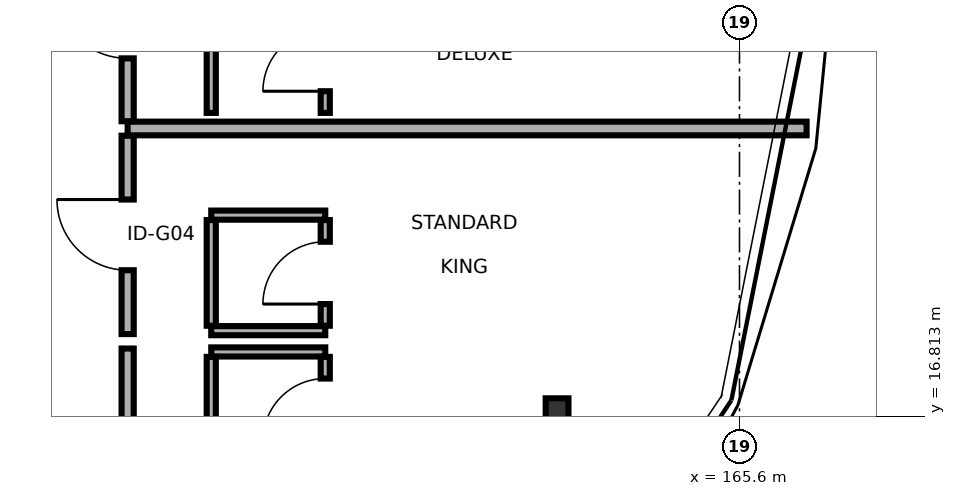
"""IFC4 building model, lengths in metres.
Left out: names, types, materials, properties, quantities, classifications, styles, units other than length and angle.
Written with IfcOpenShell. Run it as: python <this file> out.ifc"""

import sys

from ifc_helpers import new_model, si_unit, direction, frame, frame_2d, origin, origin_2d, place, context, subcontext, project, spatial, rectangle, i_section, extrude, element, fill, save


model = new_model("IFC4")
c1 = context("Model", 3, precision=1e-05, world=origin(), true_north=direction((0.0, 1.0)))
c2 = subcontext(c1, "Body", "Model", "MODEL_VIEW")
j1 = project(units=[si_unit("LENGTHUNIT", "METRE"), si_unit("PLANEANGLEUNIT", "RADIAN")], contexts=[c1])
p1 = place(None, origin())
s1 = spatial("IfcSite", under=j1, at=p1, CompositionType="ELEMENT")
p2 = place(p1, origin())
s2 = spatial("IfcBuilding", under=s1, at=p2, CompositionType="ELEMENT")
p3 = place(p2, frame((0.0, 0.0, 24.9)))
s3 = spatial("IfcBuildingStorey", under=s2, at=p3, CompositionType="ELEMENT", Elevation=24.9)
p4 = place(p3, frame((163.2, 16.8, 0.0), z_axis=(0.0, 0.0, 1.0), x_axis=(1.0, 0.0, 0.0)))
e1 = element("IfcColumn", 1, at=p4, inside=s3, PredefinedType="COLUMN", context=c2, shape_type="SweptSolid", body=[
    extrude(i_section(OverallWidth=0.3, OverallDepth=0.5, WebThickness=0.014, FlangeThickness=0.028, FilletRadius=0.027, at=origin_2d()), origin(), (0.0, 0.0, 1.0), 3.4),
])
p5 = place(p3, frame((157.55, 15.095, 0.0), z_axis=(0.0, 0.0, 1.0), x_axis=(0.0, 1.0, 0.0)))
e2 = element("IfcWall", 2, at=p5, inside=s3, PredefinedType="PARTITIONING", context=c2, shape_type="SweptSolid", body=[
    extrude(rectangle(XDim=2.61, YDim=0.16, at=frame_2d((1.305, 0.0))), origin(), (0.0, 0.0, 1.0), 2.725),
])
p6 = place(p5, frame((0.16, 0.0, 0.0)))
e3 = element("IfcOpeningElement", 3, at=p6, cuts=e2, PredefinedType="OPENING", context=c2, shape_type="SweptSolid", body=[
    extrude(rectangle(XDim=0.905, YDim=2.05, at=frame_2d((0.453, 1.025))), frame((0.0, 0.09, 0.0), z_axis=(0.0, -1.0, 0.0), x_axis=(1.0, 0.0, 0.0)), (0.0, 0.0, 1.0), 0.18),
])
p7 = place(p3, frame((158.65, 17.66, 0.0), z_axis=(0.0, 0.0, 1.0), x_axis=(1.0, 0.0, 0.0)))
e4 = element("IfcWall", 4, at=p7, inside=s3, PredefinedType="PARTITIONING", context=c2, shape_type="SweptSolid", body=[
    extrude(rectangle(XDim=1.5, YDim=0.12, at=frame_2d((0.75, 0.0))), origin(), (0.0, 0.0, 1.0), 3.19),
])
p8 = place(p3, frame((158.65, 16.205, 0.0), z_axis=(0.0, 0.0, 1.0), x_axis=(0.0, 1.0, 0.0)))
e5 = element("IfcWall", 5, at=p8, inside=s3, PredefinedType="PARTITIONING", context=c2, shape_type="SweptSolid", body=[
    extrude(rectangle(XDim=1.39, YDim=0.12, at=frame_2d((0.695, 0.0))), origin(), (0.0, 0.0, 1.0), 2.725),
])
p9 = place(p3, frame((160.15, 16.205, 0.0), z_axis=(0.0, 0.0, 1.0), x_axis=(0.0, 1.0, 0.0)))
e6 = element("IfcWall", 6, at=p9, inside=s3, PredefinedType="PARTITIONING", context=c2, shape_type="SweptSolid", body=[
    extrude(rectangle(XDim=1.39, YDim=0.12, at=frame_2d((0.695, 0.0))), origin(), (0.0, 0.0, 1.0), 2.725),
])
p10 = place(p9, frame((0.285, 0.0, 0.0)))
e7 = element("IfcOpeningElement", 7, at=p10, cuts=e6, PredefinedType="OPENING", context=c2, shape_type="SweptSolid", body=[
    extrude(rectangle(XDim=0.82, YDim=2.08, at=frame_2d((0.41, 1.04))), frame((0.0, 0.07, 0.0), z_axis=(0.0, -1.0, 0.0), x_axis=(1.0, 0.0, 0.0)), (0.0, 0.0, 1.0), 0.14),
])
p11 = place(p3, frame((157.55, 17.895, 0.0), z_axis=(0.0, 0.0, 1.0), x_axis=(0.0, 1.0, 0.0)))
e8 = element("IfcWall", 8, at=p11, inside=s3, PredefinedType="PARTITIONING", context=c2, shape_type="SweptSolid", body=[
    extrude(rectangle(XDim=2.61, YDim=0.16, at=frame_2d((1.305, 0.0))), origin(), (0.0, 0.0, 1.0), 3.19),
])
p12 = place(p11, frame((0.84, 0.0, 0.0)))
e9 = element("IfcOpeningElement", 9, at=p12, cuts=e8, PredefinedType="OPENING", context=c2, shape_type="SweptSolid", body=[
    extrude(rectangle(XDim=0.93, YDim=2.05, at=frame_2d((0.465, 1.025))), frame((0.0, 0.09, 0.0), z_axis=(0.0, -1.0, 0.0), x_axis=(1.0, 0.0, 0.0)), (0.0, 0.0, 1.0), 0.18),
])
for number, where, z_axis, x_axis in (
    (10, (158.65, 17.94, 0.0), (0.0, 0.0, 1.0), (1.0, 0.0, 0.0)),
    (11, (158.65, 19.46, 0.0), (0.0, 0.0, 1.0), (1.0, 0.0, 0.0)),
):
    element("IfcWall", number, at=place(p3, frame(where, z_axis=z_axis, x_axis=x_axis)), inside=s3, PredefinedType="PARTITIONING", context=c2, shape_type="SweptSolid", body=[
        extrude(rectangle(XDim=1.5, YDim=0.12, at=frame_2d((0.75, 0.0))), origin(), (0.0, 0.0, 1.0), 3.19),
    ])
p13 = place(p3, frame((158.65, 18.005, 0.0), z_axis=(0.0, 0.0, 1.0), x_axis=(0.0, 1.0, 0.0)))
e12 = element("IfcWall", 12, at=p13, inside=s3, PredefinedType="PARTITIONING", context=c2, shape_type="SweptSolid", body=[
    extrude(rectangle(XDim=1.39, YDim=0.12, at=frame_2d((0.695, 0.0))), origin(), (0.0, 0.0, 1.0), 3.19),
])
p14 = place(p3, frame((160.15, 18.005, 0.0), z_axis=(0.0, 0.0, 1.0), x_axis=(0.0, 1.0, 0.0)))
e13 = element("IfcWall", 13, at=p14, inside=s3, PredefinedType="PARTITIONING", context=c2, shape_type="SweptSolid", body=[
    extrude(rectangle(XDim=1.39, YDim=0.12, at=frame_2d((0.695, 0.0))), origin(), (0.0, 0.0, 1.0), 3.19),
])
p15 = place(p14, frame((0.285, 0.0, 0.0)))
e14 = element("IfcOpeningElement", 14, at=p15, cuts=e13, PredefinedType="OPENING", context=c2, shape_type="SweptSolid", body=[
    extrude(rectangle(XDim=0.82, YDim=2.08, at=frame_2d((0.41, 1.04))), frame((0.0, 0.07, 0.0), z_axis=(0.0, -1.0, 0.0), x_axis=(1.0, 0.0, 0.0)), (0.0, 0.0, 1.0), 0.14),
])
p16 = place(p3, frame((157.55, 20.6, 0.0), z_axis=(0.0, 0.0, 1.0), x_axis=(1.0, 0.0, 0.0)))
e15 = element("IfcWall", 15, at=p16, inside=s3, PredefinedType="PARTITIONING", context=c2, shape_type="SweptSolid", body=[
    extrude(rectangle(XDim=8.933, YDim=0.18, at=frame_2d((4.466, 0.0))), origin(), (0.0, 0.0, 1.0), 2.675),
])
p17 = place(p3, frame((157.55, 20.695, 0.0), z_axis=(0.0, 0.0, 1.0), x_axis=(0.0, 1.0, 0.0)))
e16 = element("IfcWall", 16, at=p17, inside=s3, PredefinedType="PARTITIONING", context=c2, shape_type="SweptSolid", body=[
    extrude(rectangle(XDim=2.61, YDim=0.16, at=frame_2d((1.305, 0.0))), origin(), (0.0, 0.0, 1.0), 3.19),
])
p18 = place(p17, frame((0.827, 0.0, 0.0)))
e17 = element("IfcOpeningElement", 17, at=p18, cuts=e16, PredefinedType="OPENING", context=c2, shape_type="SweptSolid", body=[
    extrude(rectangle(XDim=0.955, YDim=2.05, at=frame_2d((0.478, 1.025))), frame((0.0, 0.09, 0.0), z_axis=(0.0, -1.0, 0.0), x_axis=(1.0, 0.0, 0.0)), (0.0, 0.0, 1.0), 0.18),
])
p19 = place(p3, frame((158.65, 20.805, 0.0), z_axis=(0.0, 0.0, 1.0), x_axis=(0.0, 1.0, 0.0)))
e18 = element("IfcWall", 18, at=p19, inside=s3, PredefinedType="PARTITIONING", context=c2, shape_type="SweptSolid", body=[
    extrude(rectangle(XDim=1.39, YDim=0.12, at=frame_2d((0.695, 0.0))), origin(), (0.0, 0.0, 1.0), 3.19),
])
p20 = place(p3, frame((160.15, 20.805, 0.0), z_axis=(0.0, 0.0, 1.0), x_axis=(0.0, 1.0, 0.0)))
e19 = element("IfcWall", 19, at=p20, inside=s3, PredefinedType="PARTITIONING", context=c2, shape_type="SweptSolid", body=[
    extrude(rectangle(XDim=1.39, YDim=0.12, at=frame_2d((0.695, 0.0))), origin(), (0.0, 0.0, 1.0), 3.19),
])
p21 = place(p20, frame((0.285, 0.0, 0.0)))
e20 = element("IfcOpeningElement", 20, at=p21, cuts=e19, PredefinedType="OPENING", context=c2, shape_type="SweptSolid", body=[
    extrude(rectangle(XDim=0.82, YDim=2.08, at=frame_2d((0.41, 1.04))), frame((0.0, 0.07, 0.0), z_axis=(0.0, -1.0, 0.0), x_axis=(1.0, 0.0, 0.0)), (0.0, 0.0, 1.0), 0.14),
])
p22 = place(p10, origin())
e21 = element("IfcDoor", 21, at=p22, inside=s3, OperationType="SINGLE_SWING_LEFT", PredefinedType="DOOR", context=c2, shape_type="SweptSolid", body=[
    extrude(rectangle(XDim=0.82, YDim=2.08, at=frame_2d((0.41, 1.04))), frame((0.0, 0.025, 0.0), z_axis=(0.0, -1.0, 0.0), x_axis=(1.0, 0.0, 0.0)), (0.0, 0.0, 1.0), 0.05),
])
fill(e7, e21)
p23 = place(p12, origin())
e22 = element("IfcDoor", 22, at=p23, inside=s3, OperationType="SINGLE_SWING_RIGHT", PredefinedType="DOOR", context=c2, shape_type="SweptSolid", body=[
    extrude(rectangle(XDim=0.93, YDim=2.05, at=frame_2d((0.465, 1.025))), frame((0.0, 0.025, 0.0), z_axis=(0.0, -1.0, 0.0), x_axis=(1.0, 0.0, 0.0)), (0.0, 0.0, 1.0), 0.05),
])
fill(e9, e22)
p24 = place(p15, origin())
e23 = element("IfcDoor", 23, at=p24, inside=s3, OperationType="SINGLE_SWING_LEFT", PredefinedType="DOOR", context=c2, shape_type="SweptSolid", body=[
    extrude(rectangle(XDim=0.82, YDim=2.08, at=frame_2d((0.41, 1.04))), frame((0.0, 0.025, 0.0), z_axis=(0.0, -1.0, 0.0), x_axis=(1.0, 0.0, 0.0)), (0.0, 0.0, 1.0), 0.05),
])
fill(e14, e23)
p25 = place(p18, origin())
e24 = element("IfcDoor", 24, at=p25, inside=s3, OperationType="SINGLE_SWING_RIGHT", PredefinedType="DOOR", context=c2, shape_type="SweptSolid", body=[
    extrude(rectangle(XDim=0.955, YDim=2.05, at=frame_2d((0.478, 1.025))), frame((0.0, 0.025, 0.0), z_axis=(0.0, -1.0, 0.0), x_axis=(1.0, 0.0, 0.0)), (0.0, 0.0, 1.0), 0.05),
])
fill(e17, e24)
p26 = place(p21, origin())
e25 = element("IfcDoor", 25, at=p26, inside=s3, OperationType="SINGLE_SWING_LEFT", PredefinedType="DOOR", context=c2, shape_type="SweptSolid", body=[
    extrude(rectangle(XDim=0.82, YDim=2.08, at=frame_2d((0.41, 1.04))), frame((0.0, 0.025, 0.0), z_axis=(0.0, -1.0, 0.0), x_axis=(1.0, 0.0, 0.0)), (0.0, 0.0, 1.0), 0.05),
])
fill(e20, e25)
save(model, sys.argv[1])
